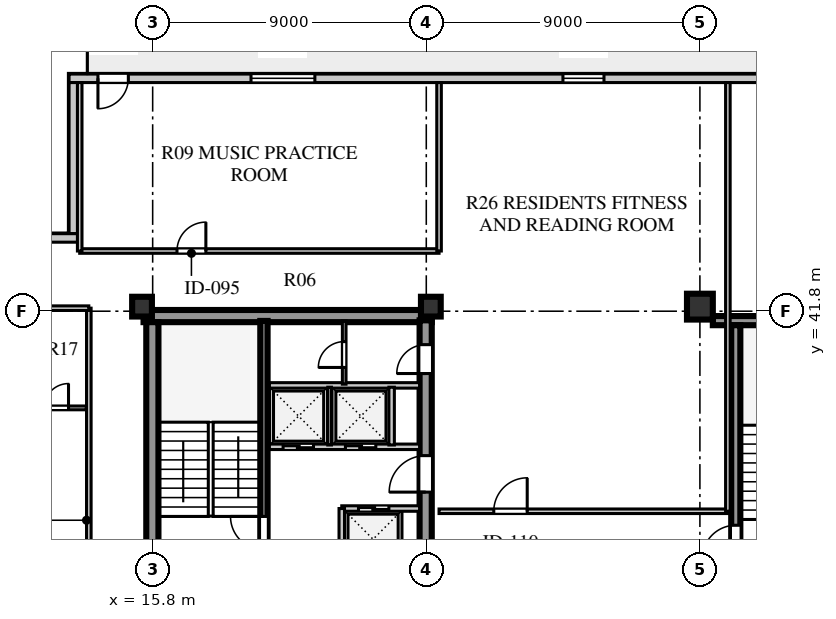
"""IFC4 building model, lengths in metres.
Left out: names, types, materials, properties, quantities, classifications, styles, units other than length and angle.
Written with IfcOpenShell. Run it as: python <this file> out.ifc"""

import sys

from ifc_helpers import new_model, si_unit, direction, frame, frame_2d, origin, origin_2d, place, context, subcontext, project, spatial, rectangle, extrude, element, fill, save


model = new_model("IFC4")
c1 = context("Model", 3, precision=1e-05, world=origin(), true_north=direction((0.0, 1.0)))
c2 = subcontext(c1, "Body", "Model", "MODEL_VIEW")
j1 = project(units=[si_unit("LENGTHUNIT", "METRE"), si_unit("PLANEANGLEUNIT", "RADIAN")], contexts=[c1])
p1 = place(None, origin())
s1 = spatial("IfcSite", under=j1, at=p1, CompositionType="ELEMENT")
p2 = place(p1, origin())
s2 = spatial("IfcBuilding", under=s1, at=p2, CompositionType="ELEMENT")
p3 = place(p2, frame((0.0, 0.0, 237.5)))
s3 = spatial("IfcBuildingStorey", under=s2, at=p3, CompositionType="ELEMENT", Elevation=237.5)
p4 = place(p3, frame((15.5, 41.64, 0.0), z_axis=(0.0, 0.0, 1.0), x_axis=(1.0, 0.0, 0.0)))
e1 = element("IfcWall", 1, at=p4, inside=s3, PredefinedType="SHEAR", context=c2, shape_type="SweptSolid", body=[
    extrude(rectangle(XDim=9.48, YDim=0.4, at=frame_2d((4.74, 0.0))), origin(), (0.0, 0.0, 1.0), 3.66),
])
p5 = place(p3, frame((15.79, 15.81, 0.0), z_axis=(0.0, 0.0, 1.0), x_axis=(0.0, 1.0, 0.0)))
e2 = element("IfcWall", 2, at=p5, inside=s3, PredefinedType="SHEAR", context=c2, shape_type="SweptSolid", body=[
    extrude(rectangle(XDim=25.63, YDim=0.4, at=frame_2d((12.815, 0.0))), origin(), (0.0, 0.0, 1.0), 3.66),
])
p6 = place(p3, frame((24.78, 15.74, 0.0), z_axis=(0.0, 0.0, 1.0), x_axis=(0.0, 1.0, 0.0)))
e3 = element("IfcWall", 3, at=p6, inside=s3, PredefinedType="SHEAR", context=c2, shape_type="SweptSolid", body=[
    extrude(rectangle(XDim=25.76, YDim=0.4, at=frame_2d((12.88, 0.0))), origin(), (0.0, 0.0, 1.0), 3.66),
])
p7 = place(p6, frame((1.61, 0.0, 0.0)))
e4 = element("IfcOpeningElement", 4, at=p7, cuts=e3, PredefinedType="OPENING", context=c2, shape_type="SweptSolid", body=[
    extrude(rectangle(XDim=1.2, YDim=2.1, at=frame_2d((0.6, 1.05))), frame((0.0, 0.21, 0.0), z_axis=(0.0, -1.0, 0.0), x_axis=(1.0, 0.0, 0.0)), (0.0, 0.0, 1.0), 0.42),
])
p8 = place(p6, frame((6.78, 0.0, 0.0)))
e5 = element("IfcOpeningElement", 5, at=p8, cuts=e3, PredefinedType="OPENING", context=c2, shape_type="SweptSolid", body=[
    extrude(rectangle(XDim=0.85, YDim=2.06, at=frame_2d((0.425, 1.03))), frame((0.0, 0.21, 0.0), z_axis=(0.0, -1.0, 0.0), x_axis=(1.0, 0.0, 0.0)), (0.0, 0.0, 1.0), 0.42),
])
p9 = place(p6, frame((12.11, 0.0, 0.0)))
e6 = element("IfcOpeningElement", 6, at=p9, cuts=e3, PredefinedType="OPENING", context=c2, shape_type="SweptSolid", body=[
    extrude(rectangle(XDim=1.5, YDim=2.12, at=frame_2d((0.75, 1.06))), frame((0.0, 0.21, 0.0), z_axis=(0.0, -1.0, 0.0), x_axis=(1.0, 0.0, 0.0)), (0.0, 0.0, 1.0), 0.42),
])
p10 = place(p6, frame((20.11, 0.0, 0.0)))
e7 = element("IfcOpeningElement", 7, at=p10, cuts=e3, PredefinedType="OPENING", context=c2, shape_type="SweptSolid", body=[
    extrude(rectangle(XDim=1.2, YDim=2.12, at=frame_2d((0.6, 1.06))), frame((0.0, 0.21, 0.0), z_axis=(0.0, -1.0, 0.0), x_axis=(1.0, 0.0, 0.0)), (0.0, 0.0, 1.0), 0.42),
])
p11 = place(p6, frame((24.01, 0.0, 0.0)))
e8 = element("IfcOpeningElement", 8, at=p11, cuts=e3, PredefinedType="OPENING", context=c2, shape_type="SweptSolid", body=[
    extrude(rectangle(XDim=0.95, YDim=2.1, at=frame_2d((0.475, 1.05))), frame((0.0, 0.21, 0.0), z_axis=(0.0, -1.0, 0.0), x_axis=(1.0, 0.0, 0.0)), (0.0, 0.0, 1.0), 0.42),
])
p12 = place(p3, frame((34.225, 41.49, 0.0), z_axis=(0.0, 0.0, 1.0), x_axis=(1.0, 0.0, 0.0)))
e9 = element("IfcWall", 9, at=p12, inside=s3, PredefinedType="SHEAR", context=c2, shape_type="SweptSolid", body=[
    extrude(rectangle(XDim=4.645, YDim=0.3, at=frame_2d((2.323, 0.0))), origin(), (0.0, 0.0, 1.0), 3.66),
])
p13 = place(p3, frame((34.98, 33.31, 0.0), z_axis=(0.0, 0.0, 1.0), x_axis=(0.0, 1.0, 0.0)))
e10 = element("IfcWall", 10, at=p13, inside=s3, PredefinedType="SHEAR", context=c2, shape_type="SweptSolid", body=[
    extrude(rectangle(XDim=8.03, YDim=0.3, at=frame_2d((4.015, 0.0))), origin(), (0.0, 0.0, 1.0), 3.66),
])
p14 = place(p13, frame((0.35, 0.0, 0.0)))
e11 = element("IfcOpeningElement", 11, at=p14, cuts=e10, PredefinedType="OPENING", context=c2, shape_type="SweptSolid", body=[
    extrude(rectangle(XDim=1.1, YDim=2.1, at=frame_2d((0.55, 1.05))), frame((0.0, 0.16, 0.0), z_axis=(0.0, -1.0, 0.0), x_axis=(1.0, 0.0, 0.0)), (0.0, 0.0, 1.0), 0.32),
])
for number, where, z_axis, x_axis in (
    (12, (15.45, 41.95, 0.0), (0.0, 0.0, 1.0), (1.0, 0.0, 0.0)),
    (13, (24.95, 41.95, 0.0), (0.0, 0.0, 1.0), (1.0, 0.0, 0.0)),
):
    element("IfcColumn", number, at=place(p3, frame(where, z_axis=z_axis, x_axis=x_axis)), inside=s3, PredefinedType="COLUMN", context=c2, shape_type="SweptSolid", body=[
        extrude(rectangle(XDim=0.65, YDim=0.65, at=origin_2d()), origin(), (0.0, 0.0, 1.0), 3.66),
    ])
p15 = place(p3, frame((33.8, 41.95, 0.0), z_axis=(0.0, 0.0, 1.0), x_axis=(1.0, 0.0, 0.0)))
e14 = element("IfcColumn", 14, at=p15, inside=s3, PredefinedType="COLUMN", context=c2, shape_type="SweptSolid", body=[
    extrude(rectangle(XDim=0.85, YDim=0.85, at=origin_2d()), origin(), (0.0, 0.0, 1.0), 3.66),
])
p16 = place(p3, frame((45.55, 49.46, 0.0), z_axis=(0.0, 0.0, 1.0), x_axis=(-1.0, 0.0, 0.0)))
e15 = element("IfcWall", 15, at=p16, inside=s3, PredefinedType="STANDARD", context=c2, shape_type="SweptSolid", body=[
    extrude(rectangle(XDim=32.5, YDim=0.28, at=frame_2d((16.25, 0.0))), origin(), (0.0, 0.0, 1.0), 3.66),
])
p17 = place(p16, frame((30.55, 0.0, 0.0)))
e16 = element("IfcOpeningElement", 16, at=p17, cuts=e15, PredefinedType="OPENING", context=c2, shape_type="SweptSolid", body=[
    extrude(rectangle(XDim=1.0, YDim=2.05, at=frame_2d((0.5, 1.025))), frame((0.0, 0.15, 0.0), z_axis=(0.0, -1.0, 0.0), x_axis=(1.0, 0.0, 0.0)), (0.0, 0.0, 1.0), 0.3),
])
p18 = place(p16, frame((24.415, 0.0, 0.8)))
e17 = element("IfcOpeningElement", 17, at=p18, cuts=e15, PredefinedType="OPENING", context=c2, shape_type="SweptSolid", body=[
    extrude(rectangle(XDim=2.1, YDim=1.95, at=frame_2d((1.05, 0.975))), frame((0.0, 0.15, 0.0), z_axis=(0.0, -1.0, 0.0), x_axis=(1.0, 0.0, 0.0)), (0.0, 0.0, 1.0), 0.3),
])
p19 = place(p16, frame((14.905, 0.0, 0.8)))
e18 = element("IfcOpeningElement", 18, at=p19, cuts=e15, PredefinedType="OPENING", context=c2, shape_type="SweptSolid", body=[
    extrude(rectangle(XDim=1.35, YDim=1.9, at=frame_2d((0.675, 0.95))), frame((0.0, 0.15, 0.0), z_axis=(0.0, -1.0, 0.0), x_axis=(1.0, 0.0, 0.0)), (0.0, 0.0, 1.0), 0.3),
])
p20 = place(p16, frame((4.645, 0.0, 0.8)))
e19 = element("IfcOpeningElement", 19, at=p20, cuts=e15, PredefinedType="OPENING", context=c2, shape_type="SweptSolid", body=[
    extrude(rectangle(XDim=1.65, YDim=1.95, at=frame_2d((0.825, 0.975))), frame((0.0, 0.15, 0.0), z_axis=(0.0, -1.0, 0.0), x_axis=(1.0, 0.0, 0.0)), (0.0, 0.0, 1.0), 0.3),
])
p21 = place(p3, frame((13.19, 49.32, 0.0), z_axis=(0.0, 0.0, 1.0), x_axis=(0.0, -1.0, 0.0)))
e20 = element("IfcWall", 20, at=p21, inside=s3, PredefinedType="STANDARD", context=c2, shape_type="SweptSolid", body=[
    extrude(rectangle(XDim=4.97, YDim=0.28, at=frame_2d((2.485, 0.0))), origin(), (0.0, 0.0, 1.0), 3.66),
])
p22 = place(p3, frame((13.33, 44.21, 0.0), z_axis=(0.0, 0.0, 1.0), x_axis=(-1.0, 0.0, 0.0)))
e21 = element("IfcWall", 21, at=p22, inside=s3, PredefinedType="STANDARD", context=c2, shape_type="SweptSolid", body=[
    extrude(rectangle(XDim=5.53, YDim=0.28, at=frame_2d((2.765, 0.0))), origin(), (0.0, 0.0, 1.0), 3.66),
])
p23 = place(p3, frame((19.46, 33.3, 0.0), z_axis=(0.0, 0.0, 1.0), x_axis=(0.0, 1.0, 0.0)))
e22 = element("IfcWall", 22, at=p23, inside=s3, PredefinedType="SHEAR", context=c2, shape_type="SweptSolid", body=[
    extrude(rectangle(XDim=8.18, YDim=0.24, at=frame_2d((4.09, 0.0))), origin(), (0.0, 0.0, 1.0), 3.9),
])
p24 = place(p23, frame((0.65, 0.0, 0.0)))
e23 = element("IfcOpeningElement", 23, at=p24, cuts=e22, PredefinedType="OPENING", context=c2, shape_type="SweptSolid", body=[
    extrude(rectangle(XDim=1.1, YDim=2.1, at=frame_2d((0.55, 1.05))), frame((0.0, 0.13, 0.0), z_axis=(0.0, -1.0, 0.0), x_axis=(1.0, 0.0, 0.0)), (0.0, 0.0, 1.0), 0.26),
])
p25 = place(p3, frame((22.02, 35.31, 0.0), z_axis=(0.0, 0.0, 1.0), x_axis=(1.0, 0.0, 0.0)))
e24 = element("IfcWall", 24, at=p25, inside=s3, PredefinedType="SOLIDWALL", context=c2, shape_type="SweptSolid", body=[
    extrude(rectangle(XDim=2.56, YDim=0.18, at=frame_2d((1.28, 0.0))), origin(), (0.0, 0.0, 1.0), 3.66),
])
p26 = place(p25, frame((0.55, 0.0, 0.0)))
e25 = element("IfcOpeningElement", 25, at=p26, cuts=e24, PredefinedType="OPENING", context=c2, shape_type="SweptSolid", body=[
    extrude(rectangle(XDim=1.0, YDim=2.1, at=frame_2d((0.5, 1.05))), frame((0.0, 0.1, 0.0), z_axis=(0.0, -1.0, 0.0), x_axis=(1.0, 0.0, 0.0)), (0.0, 0.0, 1.0), 0.2),
])
p27 = place(p3, frame((22.02, 33.3, 0.0), z_axis=(0.0, 0.0, 1.0), x_axis=(0.0, 1.0, 0.0)))
e26 = element("IfcWall", 26, at=p27, inside=s3, PredefinedType="SOLIDWALL", context=c2, shape_type="SweptSolid", body=[
    extrude(rectangle(XDim=2.01, YDim=0.18, at=frame_2d((1.005, 0.0))), origin(), (0.0, 0.0, 1.0), 3.66),
])
p28 = place(p3, frame((19.64, 37.34, 0.0), z_axis=(0.0, 0.0, 1.0), x_axis=(1.0, 0.0, 0.0)))
e27 = element("IfcWall", 27, at=p28, inside=s3, PredefinedType="SOLIDWALL", context=c2, shape_type="SweptSolid", body=[
    extrude(rectangle(XDim=4.94, YDim=0.18, at=frame_2d((2.47, 0.0))), origin(), (0.0, 0.0, 1.0), 3.66),
])
p29 = place(p28, frame((0.45, 0.0, 0.0)))
e28 = element("IfcOpeningElement", 28, at=p29, cuts=e27, PredefinedType="OPENING", context=c2, shape_type="SweptSolid", body=[
    extrude(rectangle(XDim=1.0, YDim=2.1, at=frame_2d((0.5, 1.05))), frame((0.0, 0.1, 0.0), z_axis=(0.0, -1.0, 0.0), x_axis=(1.0, 0.0, 0.0)), (0.0, 0.0, 1.0), 0.2),
])
p30 = place(p28, frame((2.5, 0.0, 0.0)))
e29 = element("IfcOpeningElement", 29, at=p30, cuts=e27, PredefinedType="OPENING", context=c2, shape_type="SweptSolid", body=[
    extrude(rectangle(XDim=1.0, YDim=2.1, at=frame_2d((0.5, 1.05))), frame((0.0, 0.1, 0.0), z_axis=(0.0, -1.0, 0.0), x_axis=(1.0, 0.0, 0.0)), (0.0, 0.0, 1.0), 0.2),
])
p31 = place(p3, frame((19.64, 39.36, 0.0), z_axis=(0.0, 0.0, 1.0), x_axis=(1.0, 0.0, 0.0)))
e30 = element("IfcWall", 30, at=p31, inside=s3, PredefinedType="SOLIDWALL", context=c2, shape_type="SweptSolid", body=[
    extrude(rectangle(XDim=4.94, YDim=0.18, at=frame_2d((2.47, 0.0))), origin(), (0.0, 0.0, 1.0), 3.66),
])
p32 = place(p3, frame((21.62, 37.4, 0.0), z_axis=(0.0, 0.0, 1.0), x_axis=(0.0, 1.0, 0.0)))
e31 = element("IfcWall", 31, at=p32, inside=s3, PredefinedType="PARTITIONING", context=c2, shape_type="SweptSolid", body=[
    extrude(rectangle(XDim=1.9, YDim=0.12, at=frame_2d((0.95, 0.0))), origin(), (0.0, 0.0, 1.0), 3.66),
])
p33 = place(p3, frame((23.66, 37.4, 0.0), z_axis=(0.0, 0.0, 1.0), x_axis=(0.0, 1.0, 0.0)))
e32 = element("IfcWall", 32, at=p33, inside=s3, PredefinedType="SOLIDWALL", context=c2, shape_type="SweptSolid", body=[
    extrude(rectangle(XDim=1.9, YDim=0.18, at=frame_2d((0.95, 0.0))), origin(), (0.0, 0.0, 1.0), 3.66),
])
p34 = place(p3, frame((22.1, 39.4, 0.0), z_axis=(0.0, 0.0, 1.0), x_axis=(0.0, 1.0, 0.0)))
e33 = element("IfcWall", 33, at=p34, inside=s3, PredefinedType="PARTITIONING", context=c2, shape_type="SweptSolid", body=[
    extrude(rectangle(XDim=2.08, YDim=0.12, at=frame_2d((1.04, 0.0))), origin(), (0.0, 0.0, 1.0), 3.66),
])
p35 = place(p34, frame((0.55, 0.0, 0.0)))
e34 = element("IfcOpeningElement", 34, at=p35, cuts=e33, PredefinedType="OPENING", context=c2, shape_type="SweptSolid", body=[
    extrude(rectangle(XDim=0.85, YDim=2.06, at=frame_2d((0.425, 1.03))), frame((0.0, 0.07, 0.0), z_axis=(0.0, -1.0, 0.0), x_axis=(1.0, 0.0, 0.0)), (0.0, 0.0, 1.0), 0.14),
])
p36 = place(p3, frame((25.22, 35.22, 0.0), z_axis=(0.0, 0.0, 1.0), x_axis=(1.0, 0.0, 0.0)))
e35 = element("IfcWall", 35, at=p36, inside=s3, PredefinedType="PARTITIONING", context=c2, shape_type="SweptSolid", body=[
    extrude(rectangle(XDim=9.5, YDim=0.15, at=frame_2d((4.75, 0.0))), origin(), (0.0, 0.0, 1.0), 3.66),
])
p37 = place(p36, frame((1.8, 0.0, 0.0)))
e36 = element("IfcOpeningElement", 36, at=p37, cuts=e35, PredefinedType="OPENING", context=c2, shape_type="SweptSolid", body=[
    extrude(rectangle(XDim=1.1, YDim=2.08, at=frame_2d((0.55, 1.04))), frame((0.0, 0.085, 0.0), z_axis=(0.0, -1.0, 0.0), x_axis=(1.0, 0.0, 0.0)), (0.0, 0.0, 1.0), 0.17),
])
p38 = place(p3, frame((13.4, 43.78, 0.0), z_axis=(0.0, 0.0, 1.0), x_axis=(1.0, 0.0, 0.0)))
e37 = element("IfcWall", 37, at=p38, inside=s3, PredefinedType="PARTITIONING", context=c2, shape_type="SweptSolid", body=[
    extrude(rectangle(XDim=11.82, YDim=0.15, at=frame_2d((5.91, 0.0))), origin(), (0.0, 0.0, 1.0), 3.66),
])
p39 = place(p38, frame((3.2, 0.0, 0.0)))
e38 = element("IfcOpeningElement", 38, at=p39, cuts=e37, PredefinedType="OPENING", context=c2, shape_type="SweptSolid", body=[
    extrude(rectangle(XDim=0.95, YDim=2.08, at=frame_2d((0.475, 1.04))), frame((0.0, 0.085, 0.0), z_axis=(0.0, -1.0, 0.0), x_axis=(1.0, 0.0, 0.0)), (0.0, 0.0, 1.0), 0.17),
])
p40 = place(p3, frame((13.4, 43.78, 0.0), z_axis=(0.0, 0.0, 1.0), x_axis=(0.0, 1.0, 0.0)))
e39 = element("IfcWall", 39, at=p40, inside=s3, PredefinedType="PARTITIONING", context=c2, shape_type="SweptSolid", body=[
    extrude(rectangle(XDim=5.54, YDim=0.15, at=frame_2d((2.77, 0.0))), origin(), (0.0, 0.0, 1.0), 3.66),
])
p41 = place(p3, frame((25.22, 43.78, 0.0), z_axis=(0.0, 0.0, 1.0), x_axis=(0.0, 1.0, 0.0)))
e40 = element("IfcWall", 40, at=p41, inside=s3, PredefinedType="PARTITIONING", context=c2, shape_type="SweptSolid", body=[
    extrude(rectangle(XDim=5.54, YDim=0.15, at=frame_2d((2.77, 0.0))), origin(), (0.0, 0.0, 1.0), 3.21),
])
p42 = place(p3, frame((13.7, 15.3, 0.0), z_axis=(0.0, 0.0, 1.0), x_axis=(0.0, 1.0, 0.0)))
e41 = element("IfcWall", 41, at=p42, inside=s3, PredefinedType="PARTITIONING", context=c2, shape_type="SweptSolid", body=[
    extrude(rectangle(XDim=26.6, YDim=0.15, at=frame_2d((13.3, 0.0))), origin(), (0.0, 0.0, 1.0), 3.66),
])
p43 = place(p42, frame((0.65, 0.0, 0.0)))
e42 = element("IfcOpeningElement", 42, at=p43, cuts=e41, PredefinedType="OPENING", context=c2, shape_type="SweptSolid", body=[
    extrude(rectangle(XDim=0.95, YDim=2.1, at=frame_2d((0.475, 1.05))), frame((0.0, 0.085, 0.0), z_axis=(0.0, -1.0, 0.0), x_axis=(1.0, 0.0, 0.0)), (0.0, 0.0, 1.0), 0.17),
])
p44 = place(p42, frame((11.55, 0.0, 0.0)))
e43 = element("IfcOpeningElement", 43, at=p44, cuts=e41, PredefinedType="OPENING", context=c2, shape_type="SweptSolid", body=[
    extrude(rectangle(XDim=0.95, YDim=2.1, at=frame_2d((0.475, 1.05))), frame((0.0, 0.085, 0.0), z_axis=(0.0, -1.0, 0.0), x_axis=(1.0, 0.0, 0.0)), (0.0, 0.0, 1.0), 0.17),
])
p45 = place(p3, frame((8.08, 41.9, 0.0), z_axis=(0.0, 0.0, 1.0), x_axis=(1.0, 0.0, 0.0)))
e44 = element("IfcWall", 44, at=p45, inside=s3, PredefinedType="PARTITIONING", context=c2, shape_type="SweptSolid", body=[
    extrude(rectangle(XDim=5.62, YDim=0.15, at=frame_2d((2.81, 0.0))), origin(), (0.0, 0.0, 1.0), 3.21),
])
p46 = place(p3, frame((10.45, 38.62, 0.0), z_axis=(0.0, 0.0, 1.0), x_axis=(1.0, 0.0, 0.0)))
e45 = element("IfcWall", 45, at=p46, inside=s3, PredefinedType="PLUMBINGWALL", context=c2, shape_type="SweptSolid", body=[
    extrude(rectangle(XDim=3.17, YDim=0.125, at=frame_2d((1.585, 0.0))), origin(), (0.0, 0.0, 1.0), 3.66),
])
p47 = place(p46, frame((0.16, 0.0, 0.0)))
e46 = element("IfcOpeningElement", 46, at=p47, cuts=e45, PredefinedType="OPENING", context=c2, shape_type="SweptSolid", body=[
    extrude(rectangle(XDim=0.8, YDim=2.05, at=frame_2d((0.4, 1.025))), frame((0.0, 0.073, 0.0), z_axis=(0.0, -1.0, 0.0), x_axis=(1.0, 0.0, 0.0)), (0.0, 0.0, 1.0), 0.145),
])
p48 = place(p46, frame((1.782, 0.0, 0.0)))
e47 = element("IfcOpeningElement", 47, at=p48, cuts=e45, PredefinedType="OPENING", context=c2, shape_type="SweptSolid", body=[
    extrude(rectangle(XDim=0.8, YDim=2.05, at=frame_2d((0.4, 1.025))), frame((0.0, 0.073, 0.0), z_axis=(0.0, -1.0, 0.0), x_axis=(1.0, 0.0, 0.0)), (0.0, 0.0, 1.0), 0.145),
])
p49 = place(p3, frame((34.72, 35.22, 0.0), z_axis=(0.0, 0.0, 1.0), x_axis=(0.0, 1.0, 0.0)))
e48 = element("IfcWall", 48, at=p49, inside=s3, PredefinedType="PARTITIONING", context=c2, shape_type="SweptSolid", body=[
    extrude(rectangle(XDim=14.1, YDim=0.15, at=frame_2d((7.05, 0.0))), origin(), (0.0, 0.0, 1.0), 3.66),
])
p50 = place(p17, frame((1.0, 0.0, 0.0), z_axis=(0.0, 0.0, 1.0), x_axis=(-1.0, 0.0, 0.0)))
e49 = element("IfcDoor", 49, at=p50, inside=s3, OperationType="SINGLE_SWING_LEFT", PredefinedType="DOOR", context=c2, shape_type="SweptSolid", body=[
    extrude(rectangle(XDim=1.0, YDim=2.05, at=frame_2d((0.5, 1.025))), frame((0.0, 0.025, 0.0), z_axis=(0.0, -1.0, 0.0), x_axis=(1.0, 0.0, 0.0)), (0.0, 0.0, 1.0), 0.05),
])
fill(e16, e49)
p51 = place(p18, origin())
e50 = element("IfcWindow", 50, at=p51, inside=s3, PartitioningType="SINGLE_PANEL", PredefinedType="WINDOW", context=c2, shape_type="SweptSolid", body=[
    extrude(rectangle(XDim=2.1, YDim=1.95, at=frame_2d((1.05, 0.975))), frame((0.0, 0.03, 0.0), z_axis=(0.0, -1.0, 0.0), x_axis=(1.0, 0.0, 0.0)), (0.0, 0.0, 1.0), 0.06),
])
fill(e17, e50)
p52 = place(p19, origin())
e51 = element("IfcWindow", 51, at=p52, inside=s3, PartitioningType="SINGLE_PANEL", PredefinedType="WINDOW", context=c2, shape_type="SweptSolid", body=[
    extrude(rectangle(XDim=1.35, YDim=1.9, at=frame_2d((0.675, 0.95))), frame((0.0, 0.03, 0.0), z_axis=(0.0, -1.0, 0.0), x_axis=(1.0, 0.0, 0.0)), (0.0, 0.0, 1.0), 0.06),
])
fill(e18, e51)
p53 = place(p24, origin())
e52 = element("IfcDoor", 52, at=p53, inside=s3, OperationType="SINGLE_SWING_RIGHT", PredefinedType="DOOR", context=c2, shape_type="SweptSolid", body=[
    extrude(rectangle(XDim=1.1, YDim=2.1, at=frame_2d((0.55, 1.05))), frame((0.0, 0.025, 0.0), z_axis=(0.0, -1.0, 0.0), x_axis=(1.0, 0.0, 0.0)), (0.0, 0.0, 1.0), 0.05),
])
fill(e23, e52)
p54 = place(p10, frame((1.2, 0.0, 0.0), z_axis=(0.0, 0.0, 1.0), x_axis=(-1.0, 0.0, 0.0)))
e53 = element("IfcDoor", 53, at=p54, inside=s3, OperationType="SINGLE_SWING_RIGHT", PredefinedType="DOOR", context=c2, shape_type="SweptSolid", body=[
    extrude(rectangle(XDim=1.2, YDim=2.12, at=frame_2d((0.6, 1.06))), frame((0.0, 0.025, 0.0), z_axis=(0.0, -1.0, 0.0), x_axis=(1.0, 0.0, 0.0)), (0.0, 0.0, 1.0), 0.05),
])
fill(e7, e53)
p55 = place(p29, frame((1.0, 0.0, 0.0), z_axis=(0.0, 0.0, 1.0), x_axis=(-1.0, 0.0, 0.0)))
e54 = element("IfcDoor", 54, at=p55, inside=s3, OperationType="DOUBLE_DOOR_SLIDING", PredefinedType="DOOR", context=c2, shape_type="SweptSolid", body=[
    extrude(rectangle(XDim=1.0, YDim=2.1, at=frame_2d((0.5, 1.05))), frame((0.0, 0.025, 0.0), z_axis=(0.0, -1.0, 0.0), x_axis=(1.0, 0.0, 0.0)), (0.0, 0.0, 1.0), 0.05),
])
fill(e28, e54)
p56 = place(p30, frame((1.0, 0.0, 0.0), z_axis=(0.0, 0.0, 1.0), x_axis=(-1.0, 0.0, 0.0)))
e55 = element("IfcDoor", 55, at=p56, inside=s3, OperationType="DOUBLE_DOOR_SLIDING", PredefinedType="DOOR", context=c2, shape_type="SweptSolid", body=[
    extrude(rectangle(XDim=1.0, YDim=2.1, at=frame_2d((0.5, 1.05))), frame((0.0, 0.025, 0.0), z_axis=(0.0, -1.0, 0.0), x_axis=(1.0, 0.0, 0.0)), (0.0, 0.0, 1.0), 0.05),
])
fill(e29, e55)
p57 = place(p26, origin())
e56 = element("IfcDoor", 56, at=p57, inside=s3, OperationType="DOUBLE_DOOR_SLIDING", PredefinedType="DOOR", context=c2, shape_type="SweptSolid", body=[
    extrude(rectangle(XDim=1.0, YDim=2.1, at=frame_2d((0.5, 1.05))), frame((0.0, 0.025, 0.0), z_axis=(0.0, -1.0, 0.0), x_axis=(1.0, 0.0, 0.0)), (0.0, 0.0, 1.0), 0.05),
])
fill(e25, e56)
p58 = place(p35, origin())
e57 = element("IfcDoor", 57, at=p58, inside=s3, OperationType="SINGLE_SWING_LEFT", PredefinedType="DOOR", context=c2, shape_type="SweptSolid", body=[
    extrude(rectangle(XDim=0.85, YDim=2.06, at=frame_2d((0.425, 1.03))), frame((0.0, 0.025, 0.0), z_axis=(0.0, -1.0, 0.0), x_axis=(1.0, 0.0, 0.0)), (0.0, 0.0, 1.0), 0.05),
])
fill(e34, e57)
p59 = place(p11, frame((0.95, 0.0, 0.0), z_axis=(0.0, 0.0, 1.0), x_axis=(-1.0, 0.0, 0.0)))
e58 = element("IfcDoor", 58, at=p59, inside=s3, OperationType="SINGLE_SWING_RIGHT", PredefinedType="DOOR", context=c2, shape_type="SweptSolid", body=[
    extrude(rectangle(XDim=0.95, YDim=2.1, at=frame_2d((0.475, 1.05))), frame((0.0, 0.025, 0.0), z_axis=(0.0, -1.0, 0.0), x_axis=(1.0, 0.0, 0.0)), (0.0, 0.0, 1.0), 0.05),
])
fill(e8, e58)
p60 = place(p14, origin())
e59 = element("IfcDoor", 59, at=p60, inside=s3, OperationType="SINGLE_SWING_LEFT", PredefinedType="DOOR", context=c2, shape_type="SweptSolid", body=[
    extrude(rectangle(XDim=1.1, YDim=2.1, at=frame_2d((0.55, 1.05))), frame((0.0, 0.025, 0.0), z_axis=(0.0, -1.0, 0.0), x_axis=(1.0, 0.0, 0.0)), (0.0, 0.0, 1.0), 0.05),
])
fill(e11, e59)
p61 = place(p39, origin())
e60 = element("IfcDoor", 60, at=p61, inside=s3, OperationType="SINGLE_SWING_RIGHT", PredefinedType="DOOR", context=c2, shape_type="SweptSolid", body=[
    extrude(rectangle(XDim=0.95, YDim=2.08, at=frame_2d((0.475, 1.04))), frame((0.0, 0.025, 0.0), z_axis=(0.0, -1.0, 0.0), x_axis=(1.0, 0.0, 0.0)), (0.0, 0.0, 1.0), 0.05),
])
fill(e38, e60)
p62 = place(p48, origin())
e61 = element("IfcDoor", 61, at=p62, inside=s3, OperationType="SINGLE_SWING_RIGHT", PredefinedType="DOOR", context=c2, shape_type="SweptSolid", body=[
    extrude(rectangle(XDim=0.8, YDim=2.05, at=frame_2d((0.4, 1.025))), frame((0.0, 0.025, 0.0), z_axis=(0.0, -1.0, 0.0), x_axis=(1.0, 0.0, 0.0)), (0.0, 0.0, 1.0), 0.05),
])
fill(e47, e61)
p63 = place(p37, origin())
e62 = element("IfcDoor", 62, at=p63, inside=s3, OperationType="SINGLE_SWING_RIGHT", PredefinedType="DOOR", context=c2, shape_type="SweptSolid", body=[
    extrude(rectangle(XDim=1.1, YDim=2.08, at=frame_2d((0.55, 1.04))), frame((0.0, 0.025, 0.0), z_axis=(0.0, -1.0, 0.0), x_axis=(1.0, 0.0, 0.0)), (0.0, 0.0, 1.0), 0.05),
])
fill(e36, e62)
save(model, sys.argv[1])
